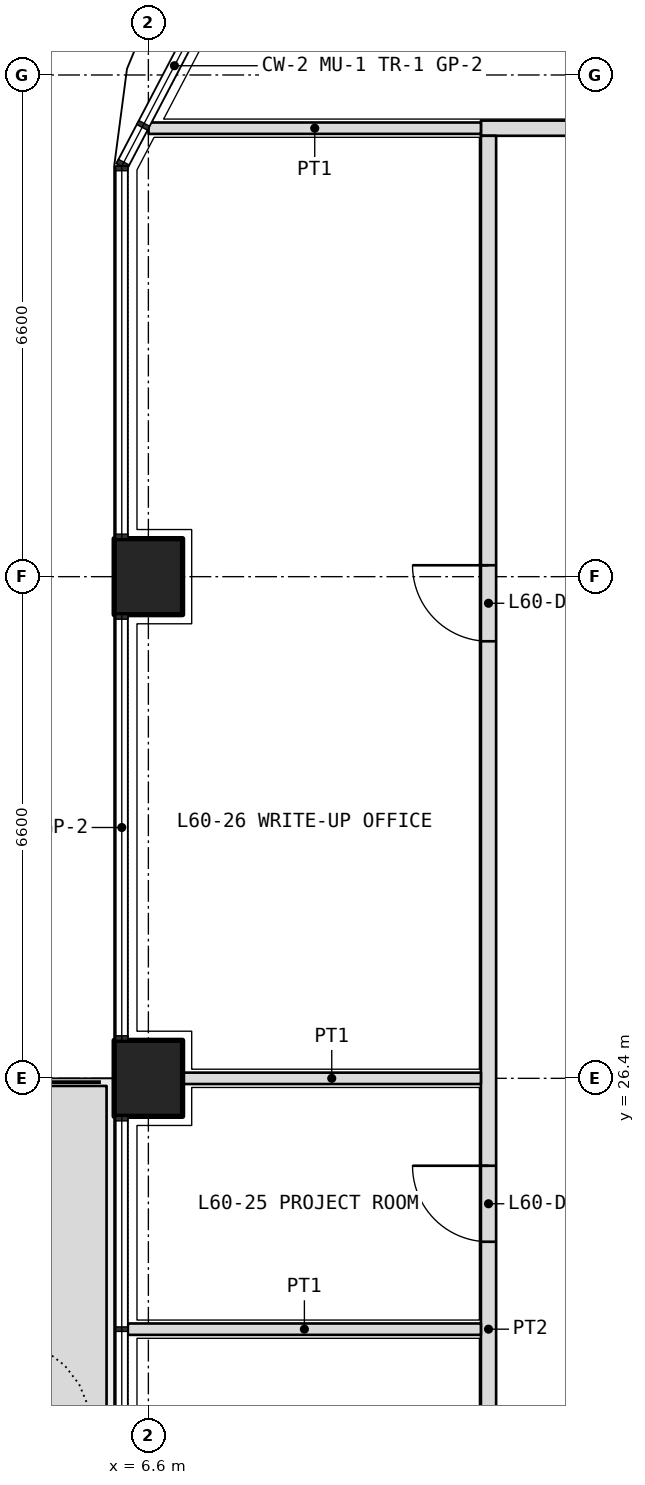
"""IFC4 building model, lengths in metres.
Left out: names, types, materials, properties, quantities, classifications, styles, units other than length and angle.
Written with IfcOpenShell. Run it as: python <this file> out.ifc"""

import sys

from ifc_helpers import new_model, si_unit, direction, frame, frame_2d, origin, origin_2d, place, context, subcontext, project, spatial, polyline, rectangle, outline, extrude, element, fill, save


model = new_model("IFC4")
c1 = context("Model", 3, precision=1e-05, world=origin(), true_north=direction((0.0, 1.0)))
c2 = subcontext(c1, "Body", "Model", "MODEL_VIEW")
j1 = project(units=[si_unit("LENGTHUNIT", "METRE"), si_unit("PLANEANGLEUNIT", "RADIAN")], contexts=[c1])
p1 = place(None, origin())
s1 = spatial("IfcSite", under=j1, at=p1, CompositionType="ELEMENT")
p2 = place(p1, origin())
s2 = spatial("IfcBuilding", under=s1, at=p2, CompositionType="ELEMENT")
p3 = place(p2, frame((0.0, 0.0, 262.8)))
s3 = spatial("IfcBuildingStorey", under=s2, at=p3, CompositionType="ELEMENT", Elevation=262.8)
for number, where, z_axis, x_axis in (
    (1, (6.6, 26.4, 0.0), (0.0, 0.0, 1.0), (0.0, 1.0, 0.0)),
    (2, (6.6, 33.0, 0.0), (0.0, 0.0, 1.0), (0.0, 1.0, 0.0)),
):
    element("IfcColumn", number, at=place(p3, frame(where, z_axis=z_axis, x_axis=x_axis)), inside=s3, PredefinedType="COLUMN", context=c2, shape_type="SweptSolid", body=[
        extrude(rectangle(XDim=1.0, YDim=0.9, at=origin_2d()), origin(), (0.0, 0.0, 1.0), 4.2),
    ])
p4 = place(p3, origin())
e3 = element("IfcWall", 3, at=p4, inside=s3, PredefinedType="USERDEFINED", context=c2, shape_type="SweptSolid", body=[
    extrude(outline(polyline([(5.05, 17.25), (6.05, 17.25), (6.05, 26.3), (5.05, 26.3), (5.05, 17.25)]), holes=[polyline([(5.2, 17.4), (5.9, 17.4), (5.9, 26.15), (5.2, 26.15), (5.2, 17.4)])]), origin(), (0.0, 0.0, 1.0), 1.05),
])
p5 = place(p3, frame((10.975, 38.9, 0.0), z_axis=(0.0, 0.0, 1.0), x_axis=(1.0, 0.0, 0.0)))
e4 = element("IfcWall", 4, at=p5, inside=s3, PredefinedType="PARTITIONING", context=c2, shape_type="SweptSolid", body=[
    extrude(rectangle(XDim=30.85, YDim=0.2, at=frame_2d((15.425, 0.0))), origin(), (0.0, 0.0, 1.0), 3.0),
])
p6 = place(p5, frame((7.262, 0.0, 0.0)))
e5 = element("IfcOpeningElement", 5, at=p6, cuts=e4, PredefinedType="OPENING", context=c2, shape_type="SweptSolid", body=[
    extrude(rectangle(XDim=1.0, YDim=2.1, at=frame_2d((0.5, 1.05))), frame((0.0, 0.11, 0.0), z_axis=(0.0, -1.0, 0.0), x_axis=(1.0, 0.0, 0.0)), (0.0, 0.0, 1.0), 0.22),
])
p7 = place(p5, frame((21.525, 0.0, 0.0)))
e6 = element("IfcOpeningElement", 6, at=p7, cuts=e4, PredefinedType="OPENING", context=c2, shape_type="SweptSolid", body=[
    extrude(rectangle(XDim=1.0, YDim=2.1, at=frame_2d((0.5, 1.05))), frame((0.0, 0.11, 0.0), z_axis=(0.0, -1.0, 0.0), x_axis=(1.0, 0.0, 0.0)), (0.0, 0.0, 1.0), 0.22),
])
p8 = place(p5, frame((29.087, 0.0, 0.0)))
e7 = element("IfcOpeningElement", 7, at=p8, cuts=e4, PredefinedType="OPENING", context=c2, shape_type="SweptSolid", body=[
    extrude(rectangle(XDim=1.2, YDim=2.1, at=frame_2d((0.6, 1.05))), frame((0.0, 0.11, 0.0), z_axis=(0.0, -1.0, 0.0), x_axis=(1.0, 0.0, 0.0)), (0.0, 0.0, 1.0), 0.22),
])
p9 = place(p3, frame((11.075, 7.4, 0.0), z_axis=(0.0, 0.0, 1.0), x_axis=(0.0, 1.0, 0.0)))
e8 = element("IfcWall", 8, at=p9, inside=s3, PredefinedType="PARTITIONING", context=c2, shape_type="SweptSolid", body=[
    extrude(rectangle(XDim=31.4, YDim=0.2, at=frame_2d((15.7, 0.0))), origin(), (0.0, 0.0, 1.0), 3.0),
])
p10 = place(p9, frame((2.25, 0.0, 0.0)))
e9 = element("IfcOpeningElement", 9, at=p10, cuts=e8, PredefinedType="OPENING", context=c2, shape_type="SweptSolid", body=[
    extrude(rectangle(XDim=1.2, YDim=2.1, at=frame_2d((0.6, 1.05))), frame((0.0, 0.11, 0.0), z_axis=(0.0, -1.0, 0.0), x_axis=(1.0, 0.0, 0.0)), (0.0, 0.0, 1.0), 0.22),
])
p11 = place(p9, frame((6.9, 0.0, 0.0)))
e10 = element("IfcOpeningElement", 10, at=p11, cuts=e8, PredefinedType="OPENING", context=c2, shape_type="SweptSolid", body=[
    extrude(rectangle(XDim=1.0, YDim=2.1, at=frame_2d((0.5, 1.05))), frame((0.0, 0.11, 0.0), z_axis=(0.0, -1.0, 0.0), x_axis=(1.0, 0.0, 0.0)), (0.0, 0.0, 1.0), 0.22),
])
p12 = place(p9, frame((10.35, 0.0, 0.0)))
e11 = element("IfcOpeningElement", 11, at=p12, cuts=e8, PredefinedType="OPENING", context=c2, shape_type="SweptSolid", body=[
    extrude(rectangle(XDim=0.9, YDim=2.1, at=frame_2d((0.45, 1.05))), frame((0.0, 0.11, 0.0), z_axis=(0.0, -1.0, 0.0), x_axis=(1.0, 0.0, 0.0)), (0.0, 0.0, 1.0), 0.22),
])
p13 = place(p9, frame((13.7, 0.0, 0.0)))
e12 = element("IfcOpeningElement", 12, at=p13, cuts=e8, PredefinedType="OPENING", context=c2, shape_type="SweptSolid", body=[
    extrude(rectangle(XDim=0.9, YDim=2.1, at=frame_2d((0.45, 1.05))), frame((0.0, 0.11, 0.0), z_axis=(0.0, -1.0, 0.0), x_axis=(1.0, 0.0, 0.0)), (0.0, 0.0, 1.0), 0.22),
])
p14 = place(p9, frame((16.85, 0.0, 0.0)))
e13 = element("IfcOpeningElement", 13, at=p14, cuts=e8, PredefinedType="OPENING", context=c2, shape_type="SweptSolid", body=[
    extrude(rectangle(XDim=1.0, YDim=2.1, at=frame_2d((0.5, 1.05))), frame((0.0, 0.11, 0.0), z_axis=(0.0, -1.0, 0.0), x_axis=(1.0, 0.0, 0.0)), (0.0, 0.0, 1.0), 0.22),
])
p15 = place(p9, frame((24.75, 0.0, 0.0)))
e14 = element("IfcOpeningElement", 14, at=p15, cuts=e8, PredefinedType="OPENING", context=c2, shape_type="SweptSolid", body=[
    extrude(rectangle(XDim=1.0, YDim=2.1, at=frame_2d((0.5, 1.05))), frame((0.0, 0.11, 0.0), z_axis=(0.0, -1.0, 0.0), x_axis=(1.0, 0.0, 0.0)), (0.0, 0.0, 1.0), 0.22),
])
p16 = place(p3, frame((6.603, 38.9, 0.0), z_axis=(0.0, 0.0, 1.0), x_axis=(1.0, 0.0, 0.0)))
e15 = element("IfcWall", 15, at=p16, inside=s3, PredefinedType="PARTITIONING", context=c2, shape_type="SweptSolid", body=[
    extrude(rectangle(XDim=4.373, YDim=0.15, at=frame_2d((2.186, 0.0))), origin(), (0.0, 0.0, 1.0), 2.7),
])
p17 = place(p3, frame((6.33, 23.1, 0.0), z_axis=(0.0, 0.0, 1.0), x_axis=(1.0, 0.0, 0.0)))
e16 = element("IfcWall", 16, at=p17, inside=s3, PredefinedType="PARTITIONING", context=c2, shape_type="SweptSolid", body=[
    extrude(rectangle(XDim=4.645, YDim=0.15, at=frame_2d((2.323, 0.0))), origin(), (0.0, 0.0, 1.0), 2.7),
])
p18 = place(p3, frame((7.05, 26.4, 0.0), z_axis=(0.0, 0.0, 1.0), x_axis=(1.0, 0.0, 0.0)))
e17 = element("IfcWall", 17, at=p18, inside=s3, PredefinedType="PARTITIONING", context=c2, shape_type="SweptSolid", body=[
    extrude(rectangle(XDim=3.925, YDim=0.15, at=frame_2d((1.962, 0.0))), origin(), (0.0, 0.0, 1.0), 3.0),
])
p19 = place(p14, origin())
e18 = element("IfcDoor", 18, at=p19, inside=s3, OperationType="SINGLE_SWING_RIGHT", PredefinedType="DOOR", context=c2, shape_type="SweptSolid", body=[
    extrude(rectangle(XDim=1.0, YDim=2.1, at=frame_2d((0.5, 1.05))), frame((0.0, 0.025, 0.0), z_axis=(0.0, -1.0, 0.0), x_axis=(1.0, 0.0, 0.0)), (0.0, 0.0, 1.0), 0.05),
])
fill(e13, e18)
p20 = place(p15, origin())
e19 = element("IfcDoor", 19, at=p20, inside=s3, OperationType="SINGLE_SWING_RIGHT", PredefinedType="DOOR", context=c2, shape_type="SweptSolid", body=[
    extrude(rectangle(XDim=1.0, YDim=2.1, at=frame_2d((0.5, 1.05))), frame((0.0, 0.025, 0.0), z_axis=(0.0, -1.0, 0.0), x_axis=(1.0, 0.0, 0.0)), (0.0, 0.0, 1.0), 0.05),
])
fill(e14, e19)
save(model, sys.argv[1])
